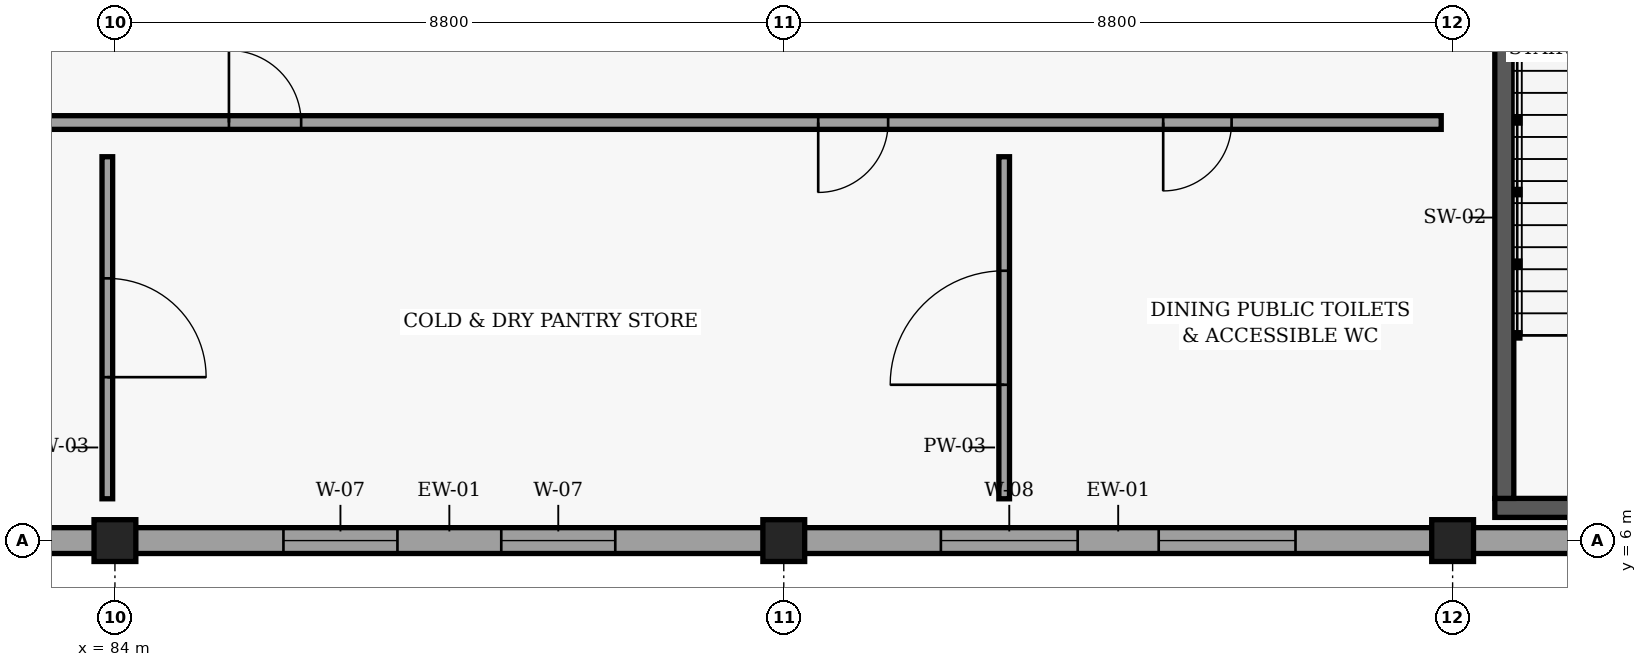
"""IFC4 building model, lengths in metres.
Left out: names, types, materials, properties, quantities, classifications, styles, units other than length and angle.
Written with IfcOpenShell. Run it as: python <this file> out.ifc"""

import sys

from ifc_helpers import new_model, si_unit, direction, frame, frame_2d, origin, origin_2d, place, context, subcontext, project, spatial, rectangle, extrude, element, fill, save


model = new_model("IFC4")
c1 = context("Model", 3, precision=1e-05, world=origin(), true_north=direction((0.0, 1.0)))
c2 = subcontext(c1, "Body", "Model", "MODEL_VIEW")
j1 = project(units=[si_unit("LENGTHUNIT", "METRE"), si_unit("PLANEANGLEUNIT", "RADIAN")], contexts=[c1])
p1 = place(None, origin())
s1 = spatial("IfcSite", under=j1, at=p1, CompositionType="ELEMENT")
p2 = place(p1, origin())
s2 = spatial("IfcBuilding", under=s1, at=p2, CompositionType="ELEMENT")
p3 = place(p2, origin())
s3 = spatial("IfcBuildingStorey", under=s2, at=p3, CompositionType="ELEMENT", Elevation=0.0)
for number, where, z_axis, x_axis in (
    (1, (84.0, 6.0, 0.0), (0.0, 0.0, 1.0), (1.0, 0.0, 0.0)),
    (2, (92.8, 6.0, 0.0), (0.0, 0.0, 1.0), (1.0, 0.0, 0.0)),
    (3, (101.6, 6.0, 0.0), (0.0, 0.0, 1.0), (1.0, 0.0, 0.0)),
):
    element("IfcColumn", number, at=place(p3, frame(where, z_axis=z_axis, x_axis=x_axis)), inside=s3, PredefinedType="COLUMN", context=c2, shape_type="SweptSolid", body=[
        extrude(rectangle(XDim=0.55, YDim=0.55, at=origin_2d()), origin(), (0.0, 0.0, 1.0), 4.8),
    ])
p4 = place(p3, frame((75.3, 6.0, 0.0), z_axis=(0.0, 0.0, 1.0), x_axis=(1.0, 0.0, 0.0)))
e4 = element("IfcWall", 4, at=p4, inside=s3, PredefinedType="SOLIDWALL", context=c2, shape_type="SweptSolid", body=[
    extrude(rectangle(XDim=8.6, YDim=0.34, at=frame_2d((4.3, 0.0))), origin(), (0.0, 0.0, 1.0), 4.065),
])
p5 = place(p4, frame((3.25, 0.0, 0.0)))
e5 = element("IfcOpeningElement", 5, at=p5, cuts=e4, PredefinedType="OPENING", context=c2, shape_type="SweptSolid", body=[
    extrude(rectangle(XDim=2.1, YDim=2.35, at=frame_2d((1.05, 1.175))), frame((0.0, 0.18, 0.0), z_axis=(0.0, -1.0, 0.0), x_axis=(1.0, 0.0, 0.0)), (0.0, 0.0, 1.0), 0.36),
])
p6 = place(p3, frame((84.1, 6.0, 0.0), z_axis=(0.0, 0.0, 1.0), x_axis=(1.0, 0.0, 0.0)))
e6 = element("IfcWall", 6, at=p6, inside=s3, PredefinedType="SOLIDWALL", context=c2, shape_type="SweptSolid", body=[
    extrude(rectangle(XDim=8.6, YDim=0.34, at=frame_2d((4.3, 0.0))), origin(), (0.0, 0.0, 1.0), 4.065),
])
p7 = place(p6, frame((2.117, 0.0, 1.1)))
e7 = element("IfcOpeningElement", 7, at=p7, cuts=e6, PredefinedType="OPENING", context=c2, shape_type="SweptSolid", body=[
    extrude(rectangle(XDim=1.5, YDim=1.8, at=frame_2d((0.75, 0.9))), frame((0.0, 0.18, 0.0), z_axis=(0.0, -1.0, 0.0), x_axis=(1.0, 0.0, 0.0)), (0.0, 0.0, 1.0), 0.36),
])
p8 = place(p6, frame((4.983, 0.0, 1.1)))
e8 = element("IfcOpeningElement", 8, at=p8, cuts=e6, PredefinedType="OPENING", context=c2, shape_type="SweptSolid", body=[
    extrude(rectangle(XDim=1.5, YDim=1.8, at=frame_2d((0.75, 0.9))), frame((0.0, 0.18, 0.0), z_axis=(0.0, -1.0, 0.0), x_axis=(1.0, 0.0, 0.0)), (0.0, 0.0, 1.0), 0.36),
])
p9 = place(p3, frame((92.9, 6.0, 0.0), z_axis=(0.0, 0.0, 1.0), x_axis=(1.0, 0.0, 0.0)))
e9 = element("IfcWall", 9, at=p9, inside=s3, PredefinedType="SOLIDWALL", context=c2, shape_type="SweptSolid", body=[
    extrude(rectangle(XDim=8.6, YDim=0.34, at=frame_2d((4.3, 0.0))), origin(), (0.0, 0.0, 1.0), 4.065),
])
p10 = place(p9, frame((1.967, 0.0, 1.1)))
e10 = element("IfcOpeningElement", 10, at=p10, cuts=e9, PredefinedType="OPENING", context=c2, shape_type="SweptSolid", body=[
    extrude(rectangle(XDim=1.8, YDim=1.8, at=frame_2d((0.9, 0.9))), frame((0.0, 0.18, 0.0), z_axis=(0.0, -1.0, 0.0), x_axis=(1.0, 0.0, 0.0)), (0.0, 0.0, 1.0), 0.36),
])
p11 = place(p9, frame((4.833, 0.0, 1.1)))
e11 = element("IfcOpeningElement", 11, at=p11, cuts=e9, PredefinedType="OPENING", context=c2, shape_type="SweptSolid", body=[
    extrude(rectangle(XDim=1.8, YDim=1.8, at=frame_2d((0.9, 0.9))), frame((0.0, 0.18, 0.0), z_axis=(0.0, -1.0, 0.0), x_axis=(1.0, 0.0, 0.0)), (0.0, 0.0, 1.0), 0.36),
])
p12 = place(p3, frame((101.7, 6.0, 0.0), z_axis=(0.0, 0.0, 1.0), x_axis=(1.0, 0.0, 0.0)))
e12 = element("IfcWall", 12, at=p12, inside=s3, PredefinedType="SOLIDWALL", context=c2, shape_type="SweptSolid", body=[
    extrude(rectangle(XDim=8.6, YDim=0.34, at=frame_2d((4.3, 0.0))), origin(), (0.0, 0.0, 1.0), 4.065),
])
p13 = place(p3, frame((105.765, 6.43, 0.0), z_axis=(0.0, 0.0, 1.0), x_axis=(-1.0, 0.0, 0.0)))
e13 = element("IfcWall", 13, at=p13, inside=s3, PredefinedType="SHEAR", context=c2, shape_type="SweptSolid", body=[
    extrude(rectangle(XDim=3.61, YDim=0.25, at=frame_2d((1.805, 0.0))), origin(), (0.0, 0.0, 1.0), 4.56),
])
p14 = place(p3, frame((102.28, 6.555, 0.0), z_axis=(0.0, 0.0, 1.0), x_axis=(0.0, 1.0, 0.0)))
e14 = element("IfcWall", 14, at=p14, inside=s3, PredefinedType="SHEAR", context=c2, shape_type="SweptSolid", body=[
    extrude(rectangle(XDim=7.39, YDim=0.25, at=frame_2d((3.695, 0.0))), origin(), (0.0, 0.0, 1.0), 4.56),
])
p15 = place(p3, frame((70.5, 11.5, 0.0), z_axis=(0.0, 0.0, 1.0), x_axis=(1.0, 0.0, 0.0)))
e15 = element("IfcWall", 15, at=p15, inside=s3, PredefinedType="PARTITIONING", context=c2, shape_type="SweptSolid", body=[
    extrude(rectangle(XDim=30.95, YDim=0.18, at=frame_2d((15.475, 0.0))), origin(), (0.0, 0.0, 1.0), 3.845),
])
p16 = place(p15, frame((7.247, 0.0, 0.0)))
e16 = element("IfcOpeningElement", 16, at=p16, cuts=e15, PredefinedType="OPENING", context=c2, shape_type="SweptSolid", body=[
    extrude(rectangle(XDim=0.98, YDim=2.12, at=frame_2d((0.49, 1.06))), frame((0.0, 0.1, 0.0), z_axis=(0.0, -1.0, 0.0), x_axis=(1.0, 0.0, 0.0)), (0.0, 0.0, 1.0), 0.2),
])
p17 = place(p15, frame((15.0, 0.0, 0.0)))
e17 = element("IfcOpeningElement", 17, at=p17, cuts=e15, PredefinedType="OPENING", context=c2, shape_type="SweptSolid", body=[
    extrude(rectangle(XDim=0.95, YDim=2.12, at=frame_2d((0.475, 1.06))), frame((0.0, 0.1, 0.0), z_axis=(0.0, -1.0, 0.0), x_axis=(1.0, 0.0, 0.0)), (0.0, 0.0, 1.0), 0.2),
])
p18 = place(p15, frame((22.753, 0.0, 0.0)))
e18 = element("IfcOpeningElement", 18, at=p18, cuts=e15, PredefinedType="OPENING", context=c2, shape_type="SweptSolid", body=[
    extrude(rectangle(XDim=0.92, YDim=2.1, at=frame_2d((0.46, 1.05))), frame((0.0, 0.1, 0.0), z_axis=(0.0, -1.0, 0.0), x_axis=(1.0, 0.0, 0.0)), (0.0, 0.0, 1.0), 0.2),
])
p19 = place(p15, frame((27.292, 0.0, 0.0)))
e19 = element("IfcOpeningElement", 19, at=p19, cuts=e15, PredefinedType="OPENING", context=c2, shape_type="SweptSolid", body=[
    extrude(rectangle(XDim=0.9, YDim=2.06, at=frame_2d((0.45, 1.03))), frame((0.0, 0.1, 0.0), z_axis=(0.0, -1.0, 0.0), x_axis=(1.0, 0.0, 0.0)), (0.0, 0.0, 1.0), 0.2),
])
p20 = place(p3, frame((83.9, 6.55, 0.0), z_axis=(0.0, 0.0, 1.0), x_axis=(0.0, 1.0, 0.0)))
e20 = element("IfcWall", 20, at=p20, inside=s3, PredefinedType="PARTITIONING", context=c2, shape_type="SweptSolid", body=[
    extrude(rectangle(XDim=4.5, YDim=0.14, at=frame_2d((2.25, 0.0))), origin(), (0.0, 0.0, 1.0), 3.845),
])
p21 = place(p20, frame((1.6, 0.0, 0.0)))
e21 = element("IfcOpeningElement", 21, at=p21, cuts=e20, PredefinedType="OPENING", context=c2, shape_type="SweptSolid", body=[
    extrude(rectangle(XDim=1.3, YDim=2.2, at=frame_2d((0.65, 1.1))), frame((0.0, 0.08, 0.0), z_axis=(0.0, -1.0, 0.0), x_axis=(1.0, 0.0, 0.0)), (0.0, 0.0, 1.0), 0.16),
])
p22 = place(p3, frame((95.7, 6.55, 0.0), z_axis=(0.0, 0.0, 1.0), x_axis=(0.0, 1.0, 0.0)))
e22 = element("IfcWall", 22, at=p22, inside=s3, PredefinedType="PARTITIONING", context=c2, shape_type="SweptSolid", body=[
    extrude(rectangle(XDim=4.5, YDim=0.14, at=frame_2d((2.25, 0.0))), origin(), (0.0, 0.0, 1.0), 4.025),
])
p23 = place(p22, frame((1.5, 0.0, 0.0)))
e23 = element("IfcOpeningElement", 23, at=p23, cuts=e22, PredefinedType="OPENING", context=c2, shape_type="SweptSolid", body=[
    extrude(rectangle(XDim=1.5, YDim=2.25, at=frame_2d((0.75, 1.125))), frame((0.0, 0.08, 0.0), z_axis=(0.0, -1.0, 0.0), x_axis=(1.0, 0.0, 0.0)), (0.0, 0.0, 1.0), 0.16),
])
p24 = place(p7, origin())
e24 = element("IfcWindow", 24, at=p24, inside=s3, PartitioningType="SINGLE_PANEL", PredefinedType="WINDOW", context=c2, shape_type="SweptSolid", body=[
    extrude(rectangle(XDim=1.5, YDim=1.8, at=frame_2d((0.75, 0.9))), frame((0.0, 0.03, 0.0), z_axis=(0.0, -1.0, 0.0), x_axis=(1.0, 0.0, 0.0)), (0.0, 0.0, 1.0), 0.06),
])
fill(e7, e24)
p25 = place(p8, origin())
e25 = element("IfcWindow", 25, at=p25, inside=s3, PartitioningType="SINGLE_PANEL", PredefinedType="WINDOW", context=c2, shape_type="SweptSolid", body=[
    extrude(rectangle(XDim=1.5, YDim=1.8, at=frame_2d((0.75, 0.9))), frame((0.0, 0.03, 0.0), z_axis=(0.0, -1.0, 0.0), x_axis=(1.0, 0.0, 0.0)), (0.0, 0.0, 1.0), 0.06),
])
fill(e8, e25)
p26 = place(p10, origin())
e26 = element("IfcWindow", 26, at=p26, inside=s3, PartitioningType="SINGLE_PANEL", PredefinedType="WINDOW", context=c2, shape_type="SweptSolid", body=[
    extrude(rectangle(XDim=1.8, YDim=1.8, at=frame_2d((0.9, 0.9))), frame((0.0, 0.03, 0.0), z_axis=(0.0, -1.0, 0.0), x_axis=(1.0, 0.0, 0.0)), (0.0, 0.0, 1.0), 0.06),
])
fill(e10, e26)
p27 = place(p11, origin())
e27 = element("IfcWindow", 27, at=p27, inside=s3, PartitioningType="SINGLE_PANEL", PredefinedType="WINDOW", context=c2, shape_type="SweptSolid", body=[
    extrude(rectangle(XDim=1.8, YDim=1.8, at=frame_2d((0.9, 0.9))), frame((0.0, 0.03, 0.0), z_axis=(0.0, -1.0, 0.0), x_axis=(1.0, 0.0, 0.0)), (0.0, 0.0, 1.0), 0.06),
])
fill(e11, e27)
p28 = place(p17, origin())
e28 = element("IfcDoor", 28, at=p28, inside=s3, OperationType="SINGLE_SWING_LEFT", PredefinedType="DOOR", context=c2, shape_type="SweptSolid", body=[
    extrude(rectangle(XDim=0.95, YDim=2.12, at=frame_2d((0.475, 1.06))), frame((0.0, 0.025, 0.0), z_axis=(0.0, -1.0, 0.0), x_axis=(1.0, 0.0, 0.0)), (0.0, 0.0, 1.0), 0.05),
])
fill(e17, e28)
p29 = place(p18, origin())
e29 = element("IfcDoor", 29, at=p29, inside=s3, OperationType="SINGLE_SWING_RIGHT", PredefinedType="DOOR", context=c2, shape_type="SweptSolid", body=[
    extrude(rectangle(XDim=0.92, YDim=2.1, at=frame_2d((0.46, 1.05))), frame((0.0, 0.025, 0.0), z_axis=(0.0, -1.0, 0.0), x_axis=(1.0, 0.0, 0.0)), (0.0, 0.0, 1.0), 0.05),
])
fill(e18, e29)
p30 = place(p21, origin())
e30 = element("IfcDoor", 30, at=p30, inside=s3, OperationType="SINGLE_SWING_RIGHT", PredefinedType="DOOR", context=c2, shape_type="SweptSolid", body=[
    extrude(rectangle(XDim=1.3, YDim=2.2, at=frame_2d((0.65, 1.1))), frame((0.0, 0.025, 0.0), z_axis=(0.0, -1.0, 0.0), x_axis=(1.0, 0.0, 0.0)), (0.0, 0.0, 1.0), 0.05),
])
fill(e21, e30)
p31 = place(p23, origin())
e31 = element("IfcDoor", 31, at=p31, inside=s3, OperationType="DOUBLE_DOOR_SINGLE_SWING", PredefinedType="DOOR", context=c2, shape_type="SweptSolid", body=[
    extrude(rectangle(XDim=1.5, YDim=2.25, at=frame_2d((0.75, 1.125))), frame((0.0, 0.025, 0.0), z_axis=(0.0, -1.0, 0.0), x_axis=(1.0, 0.0, 0.0)), (0.0, 0.0, 1.0), 0.05),
])
fill(e23, e31)
p32 = place(p19, origin())
e32 = element("IfcDoor", 32, at=p32, inside=s3, OperationType="SINGLE_SWING_RIGHT", PredefinedType="DOOR", context=c2, shape_type="SweptSolid", body=[
    extrude(rectangle(XDim=0.9, YDim=2.06, at=frame_2d((0.45, 1.03))), frame((0.0, 0.025, 0.0), z_axis=(0.0, -1.0, 0.0), x_axis=(1.0, 0.0, 0.0)), (0.0, 0.0, 1.0), 0.05),
])
fill(e19, e32)
save(model, sys.argv[1])
